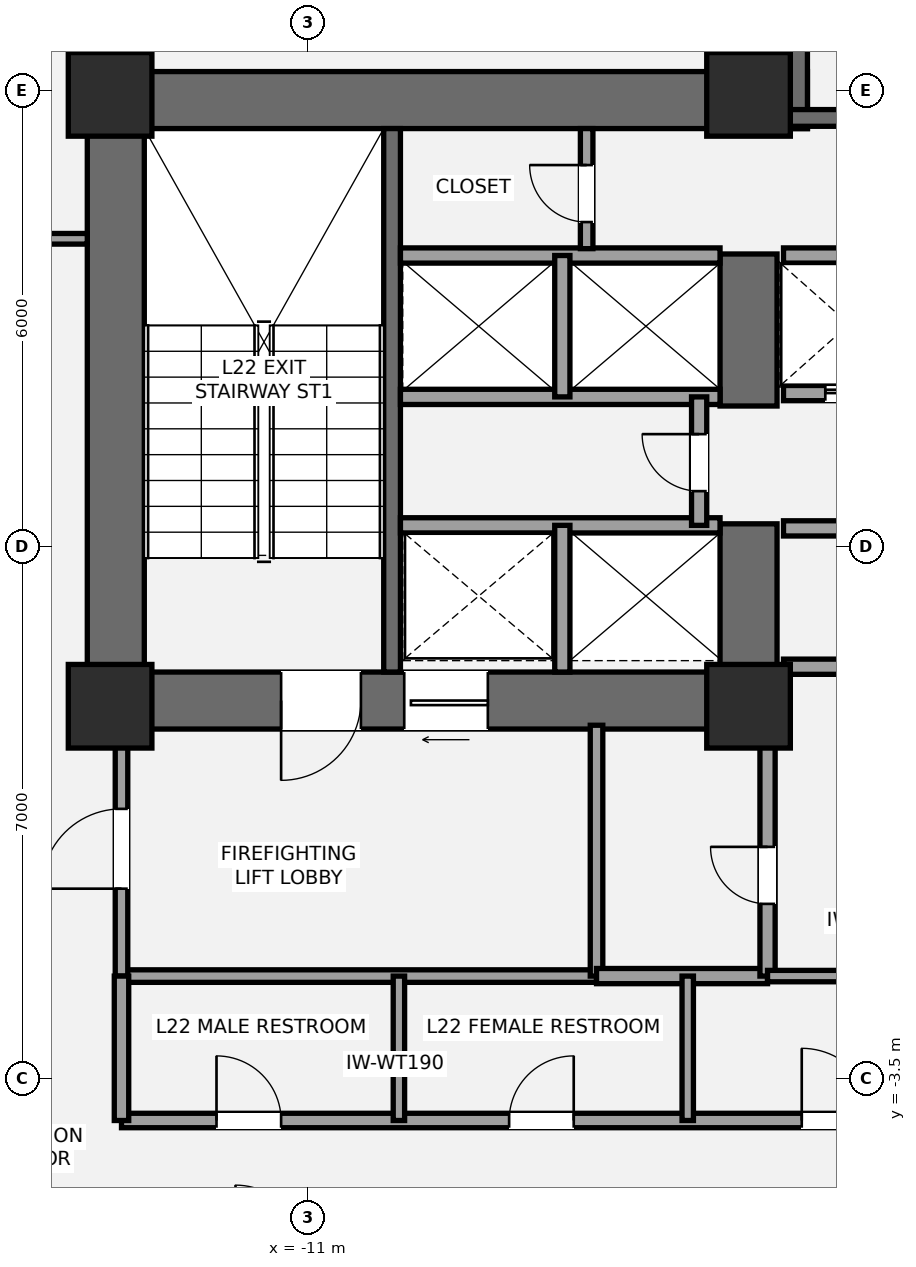
"""IFC4 building model, lengths in metres.
Left out: names, types, materials, properties, quantities, classifications, styles, units other than length and angle.
Written with IfcOpenShell. Run it as: python <this file> out.ifc"""

import sys

from ifc_helpers import new_model, si_unit, direction, frame, frame_2d, origin, origin_2d, place, context, subcontext, project, spatial, rectangle, extrude, element, fill, save


model = new_model("IFC4")
c1 = context("Model", 3, precision=1e-05, world=origin(), true_north=direction((0.0, 1.0)))
c2 = subcontext(c1, "Body", "Model", "MODEL_VIEW")
j1 = project(units=[si_unit("LENGTHUNIT", "METRE"), si_unit("PLANEANGLEUNIT", "RADIAN")], contexts=[c1])
p1 = place(None, origin())
s1 = spatial("IfcSite", under=j1, at=p1, CompositionType="ELEMENT")
p2 = place(p1, origin())
s2 = spatial("IfcBuilding", under=s1, at=p2, CompositionType="ELEMENT")
p3 = place(p2, frame((0.0, 0.0, 86.1)))
s3 = spatial("IfcBuildingStorey", under=s2, at=p3, CompositionType="ELEMENT", Elevation=86.1)
p4 = place(p3, frame((-13.525, 1.1, 0.0), z_axis=(0.0, 0.0, 1.0), x_axis=(0.0, 1.0, 0.0)))
e1 = element("IfcWall", 1, at=p4, inside=s3, PredefinedType="SHEAR", context=c2, shape_type="SweptSolid", body=[
    extrude(rectangle(XDim=8.65, YDim=0.75, at=frame_2d((4.325, 0.0))), origin(), (0.0, 0.0, 1.0), 3.5),
])
p5 = place(p3, frame((-13.9, 9.375, 0.0), z_axis=(0.0, 0.0, 1.0), x_axis=(1.0, 0.0, 0.0)))
e2 = element("IfcWall", 2, at=p5, inside=s3, PredefinedType="SHEAR", context=c2, shape_type="SweptSolid", body=[
    extrude(rectangle(XDim=9.475, YDim=0.75, at=frame_2d((4.737, 0.0))), origin(), (0.0, 0.0, 1.0), 3.5),
])
p6 = place(p3, frame((-4.825, 1.475, 0.0), z_axis=(0.0, 0.0, 1.0), x_axis=(-1.0, 0.0, 0.0)))
e3 = element("IfcWall", 3, at=p6, inside=s3, PredefinedType="SHEAR", context=c2, shape_type="SweptSolid", body=[
    extrude(rectangle(XDim=9.075, YDim=0.75, at=frame_2d((4.538, 0.0))), origin(), (0.0, 0.0, 1.0), 3.5),
])
p7 = place(p6, frame((5.475, 0.0, 0.0)))
e4 = element("IfcOpeningElement", 4, at=p7, cuts=e3, PredefinedType="OPENING", context=c2, shape_type="SweptSolid", body=[
    extrude(rectangle(XDim=1.05, YDim=2.15, at=frame_2d((0.525, 1.075))), frame((0.0, 0.385, 0.0), z_axis=(0.0, -1.0, 0.0), x_axis=(1.0, 0.0, 0.0)), (0.0, 0.0, 1.0), 0.77),
])
p8 = place(p6, frame((3.805, 0.0, 0.0)))
e5 = element("IfcOpeningElement", 5, at=p8, cuts=e3, PredefinedType="OPENING", context=c2, shape_type="SweptSolid", body=[
    extrude(rectangle(XDim=1.1, YDim=2.2, at=frame_2d((0.55, 1.1))), frame((0.0, 0.385, 0.0), z_axis=(0.0, -1.0, 0.0), x_axis=(1.0, 0.0, 0.0)), (0.0, 0.0, 1.0), 0.77),
])
p9 = place(p3, frame((-5.2, 1.1, 0.0), z_axis=(0.0, 0.0, 1.0), x_axis=(0.0, 1.0, 0.0)))
e6 = element("IfcWall", 6, at=p9, inside=s3, PredefinedType="SHEAR", context=c2, shape_type="SweptSolid", body=[
    extrude(rectangle(XDim=2.7, YDim=0.75, at=frame_2d((1.35, 0.0))), origin(), (0.0, 0.0, 1.0), 3.5),
])
p10 = place(p3, frame((-5.2, 5.35, 0.0), z_axis=(0.0, 0.0, 1.0), x_axis=(0.0, 1.0, 0.0)))
e7 = element("IfcWall", 7, at=p10, inside=s3, PredefinedType="SHEAR", context=c2, shape_type="SweptSolid", body=[
    extrude(rectangle(XDim=2.0, YDim=0.75, at=frame_2d((1.0, 0.0))), origin(), (0.0, 0.0, 1.0), 3.5),
])
p11 = place(p3, frame((-9.89, 1.85, 0.0), z_axis=(0.0, 0.0, 1.0), x_axis=(0.0, 1.0, 0.0)))
e8 = element("IfcWall", 8, at=p11, inside=s3, PredefinedType="SHEAR", context=c2, shape_type="SweptSolid", body=[
    extrude(rectangle(XDim=7.15, YDim=0.22, at=frame_2d((3.575, 0.0))), origin(), (0.0, 0.0, 1.0), 3.5),
])
p12 = place(p3, frame((-4.8, 9.0, 0.0), z_axis=(0.0, 0.0, 1.0), x_axis=(0.0, 1.0, 0.0)))
e9 = element("IfcWall", 9, at=p12, inside=s3, PredefinedType="SHEAR", context=c2, shape_type="SweptSolid", body=[
    extrude(rectangle(XDim=4.15, YDim=0.75, at=frame_2d((2.075, 0.0))), origin(), (0.0, 0.0, 1.0), 3.5),
])
p13 = place(p3, frame((-4.7, 9.14, 0.0), z_axis=(0.0, 0.0, 1.0), x_axis=(1.0, 0.0, 0.0)))
e10 = element("IfcWall", 10, at=p13, inside=s3, PredefinedType="SHEAR", context=c2, shape_type="SweptSolid", body=[
    extrude(rectangle(XDim=9.3, YDim=0.22, at=frame_2d((4.65, 0.0))), origin(), (0.0, 0.0, 1.0), 3.5),
])
p14 = place(p13, frame((1.15, 0.0, 0.0)))
e11 = element("IfcOpeningElement", 11, at=p14, cuts=e10, PredefinedType="OPENING", context=c2, shape_type="SweptSolid", body=[
    extrude(rectangle(XDim=1.05, YDim=2.15, at=frame_2d((0.525, 1.075))), frame((0.0, 0.12, 0.0), z_axis=(0.0, -1.0, 0.0), x_axis=(1.0, 0.0, 0.0)), (0.0, 0.0, 1.0), 0.24),
])
for number, where, z_axis, x_axis in (
    (12, (-13.6, 1.4, 0.0), (0.0, 0.0, 1.0), (1.0, 0.0, 0.0)),
    (13, (-13.6, 9.45, 0.0), (0.0, 0.0, 1.0), (1.0, 0.0, 0.0)),
    (14, (-5.2, 1.4, 0.0), (0.0, 0.0, 1.0), (1.0, 0.0, 0.0)),
    (15, (-5.2, 9.45, 0.0), (0.0, 0.0, 1.0), (1.0, 0.0, 0.0)),
):
    element("IfcColumn", number, at=place(p3, frame(where, z_axis=z_axis, x_axis=x_axis)), inside=s3, PredefinedType="COLUMN", context=c2, shape_type="SweptSolid", body=[
        extrude(rectangle(XDim=1.1, YDim=1.1, at=origin_2d()), origin(), (0.0, 0.0, 1.0), 3.5),
    ])
p15 = place(p3, frame((-13.45, -2.15, 0.0), z_axis=(0.0, 0.0, 1.0), x_axis=(1.0, 0.0, 0.0)))
e16 = element("IfcWall", 16, at=p15, inside=s3, PredefinedType="PARTITIONING", context=c2, shape_type="SweptSolid", body=[
    extrude(rectangle(XDim=6.25, YDim=0.165, at=frame_2d((3.125, 0.0))), origin(), (0.0, 0.0, 1.0), 3.31),
])
p16 = place(p3, frame((-13.45, -2.15, 0.0), z_axis=(0.0, 0.0, 1.0), x_axis=(0.0, 1.0, 0.0)))
e17 = element("IfcWall", 17, at=p16, inside=s3, PredefinedType="PARTITIONING", context=c2, shape_type="SweptSolid", body=[
    extrude(rectangle(XDim=3.3, YDim=0.165, at=frame_2d((1.65, 0.0))), origin(), (0.0, 0.0, 1.0), 2.763),
])
p17 = place(p16, frame((1.15, 0.0, 0.0)))
e18 = element("IfcOpeningElement", 18, at=p17, cuts=e17, PredefinedType="OPENING", context=c2, shape_type="SweptSolid", body=[
    extrude(rectangle(XDim=1.05, YDim=2.15, at=frame_2d((0.525, 1.075))), frame((0.0, 0.093, 0.0), z_axis=(0.0, -1.0, 0.0), x_axis=(1.0, 0.0, 0.0)), (0.0, 0.0, 1.0), 0.185),
])
p18 = place(p3, frame((-7.2, -2.15, 0.0), z_axis=(0.0, 0.0, 1.0), x_axis=(0.0, 1.0, 0.0)))
e19 = element("IfcWall", 19, at=p18, inside=s3, PredefinedType="PARTITIONING", context=c2, shape_type="SweptSolid", body=[
    extrude(rectangle(XDim=3.3, YDim=0.165, at=frame_2d((1.65, 0.0))), origin(), (0.0, 0.0, 1.0), 3.31),
])
p19 = place(p3, frame((-7.2, -2.15, 0.0), z_axis=(0.0, 0.0, 1.0), x_axis=(1.0, 0.0, 0.0)))
e20 = element("IfcWall", 20, at=p19, inside=s3, PredefinedType="SOLIDWALL", context=c2, shape_type="SweptSolid", body=[
    extrude(rectangle(XDim=2.25, YDim=0.2, at=frame_2d((1.125, 0.0))), origin(), (0.0, 0.0, 1.0), 3.31),
])
p20 = place(p3, frame((-4.95, -2.15, 0.0), z_axis=(0.0, 0.0, 1.0), x_axis=(0.0, 1.0, 0.0)))
e21 = element("IfcWall", 21, at=p20, inside=s3, PredefinedType="SOLIDWALL", context=c2, shape_type="SweptSolid", body=[
    extrude(rectangle(XDim=3.3, YDim=0.2, at=frame_2d((1.65, 0.0))), origin(), (0.0, 0.0, 1.0), 2.763),
])
p21 = place(p20, frame((0.95, 0.0, 0.0)))
e22 = element("IfcOpeningElement", 22, at=p21, cuts=e21, PredefinedType="OPENING", context=c2, shape_type="SweptSolid", body=[
    extrude(rectangle(XDim=0.75, YDim=2.1, at=frame_2d((0.375, 1.05))), frame((0.0, 0.11, 0.0), z_axis=(0.0, -1.0, 0.0), x_axis=(1.0, 0.0, 0.0)), (0.0, 0.0, 1.0), 0.22),
])
p22 = place(p3, frame((-9.78, 3.78, 0.0), z_axis=(0.0, 0.0, 1.0), x_axis=(1.0, 0.0, 0.0)))
e23 = element("IfcWall", 23, at=p22, inside=s3, PredefinedType="SOLIDWALL", context=c2, shape_type="SweptSolid", body=[
    extrude(rectangle(XDim=4.205, YDim=0.2, at=frame_2d((2.103, 0.0))), origin(), (0.0, 0.0, 1.0), 3.31),
])
p23 = place(p3, frame((-7.65, 1.85, 0.0), z_axis=(0.0, 0.0, 1.0), x_axis=(0.0, 1.0, 0.0)))
e24 = element("IfcWall", 24, at=p23, inside=s3, PredefinedType="SOLIDWALL", context=c2, shape_type="SweptSolid", body=[
    extrude(rectangle(XDim=1.93, YDim=0.2, at=frame_2d((0.965, 0.0))), origin(), (0.0, 0.0, 1.0), 3.31),
])
for number, where, z_axis, x_axis in (
    (25, (-9.78, 5.47, 0.0), (0.0, 0.0, 1.0), (1.0, 0.0, 0.0)),
    (26, (-9.78, 7.33, 0.0), (0.0, 0.0, 1.0), (1.0, 0.0, 0.0)),
):
    element("IfcWall", number, at=place(p3, frame(where, z_axis=z_axis, x_axis=x_axis)), inside=s3, PredefinedType="SOLIDWALL", context=c2, shape_type="SweptSolid", body=[
        extrude(rectangle(XDim=4.205, YDim=0.2, at=frame_2d((2.103, 0.0))), origin(), (0.0, 0.0, 1.0), 3.31),
    ])
p24 = place(p3, frame((-7.65, 5.47, 0.0), z_axis=(0.0, 0.0, 1.0), x_axis=(0.0, 1.0, 0.0)))
e27 = element("IfcWall", 27, at=p24, inside=s3, PredefinedType="SOLIDWALL", context=c2, shape_type="SweptSolid", body=[
    extrude(rectangle(XDim=1.86, YDim=0.2, at=frame_2d((0.93, 0.0))), origin(), (0.0, 0.0, 1.0), 3.31),
])
p25 = place(p3, frame((-5.85, 3.78, 0.0), z_axis=(0.0, 0.0, 1.0), x_axis=(0.0, 1.0, 0.0)))
e28 = element("IfcWall", 28, at=p25, inside=s3, PredefinedType="SOLIDWALL", context=c2, shape_type="SweptSolid", body=[
    extrude(rectangle(XDim=1.69, YDim=0.2, at=frame_2d((0.845, 0.0))), origin(), (0.0, 0.0, 1.0), 3.31),
])
p26 = place(p25, frame((0.45, 0.0, 0.0)))
e29 = element("IfcOpeningElement", 29, at=p26, cuts=e28, PredefinedType="OPENING", context=c2, shape_type="SweptSolid", body=[
    extrude(rectangle(XDim=0.75, YDim=2.1, at=frame_2d((0.375, 1.05))), frame((0.0, 0.11, 0.0), z_axis=(0.0, -1.0, 0.0), x_axis=(1.0, 0.0, 0.0)), (0.0, 0.0, 1.0), 0.22),
])
p27 = place(p3, frame((-4.74, 1.92, 0.0), z_axis=(0.0, 0.0, 1.0), x_axis=(1.0, 0.0, 0.0)))
e30 = element("IfcWall", 30, at=p27, inside=s3, PredefinedType="SOLIDWALL", context=c2, shape_type="SweptSolid", body=[
    extrude(rectangle(XDim=9.48, YDim=0.2, at=frame_2d((4.74, 0.0))), origin(), (0.0, 0.0, 1.0), 2.3),
])
p28 = place(p3, frame((-4.74, 3.74, 0.0), z_axis=(0.0, 0.0, 1.0), x_axis=(1.0, 0.0, 0.0)))
e31 = element("IfcWall", 31, at=p28, inside=s3, PredefinedType="SOLIDWALL", context=c2, shape_type="SweptSolid", body=[
    extrude(rectangle(XDim=9.48, YDim=0.2, at=frame_2d((4.74, 0.0))), origin(), (0.0, 0.0, 1.0), 3.31),
])
p29 = place(p28, frame((1.8, 0.0, 0.0)))
e32 = element("IfcOpeningElement", 32, at=p29, cuts=e31, PredefinedType="OPENING", context=c2, shape_type="SweptSolid", body=[
    extrude(rectangle(XDim=0.85, YDim=2.1, at=frame_2d((0.425, 1.05))), frame((0.0, 0.11, 0.0), z_axis=(0.0, -1.0, 0.0), x_axis=(1.0, 0.0, 0.0)), (0.0, 0.0, 1.0), 0.22),
])
p30 = place(p28, frame((6.8, 0.0, 0.0)))
e33 = element("IfcOpeningElement", 33, at=p30, cuts=e31, PredefinedType="OPENING", context=c2, shape_type="SweptSolid", body=[
    extrude(rectangle(XDim=0.85, YDim=2.1, at=frame_2d((0.425, 1.05))), frame((0.0, 0.11, 0.0), z_axis=(0.0, -1.0, 0.0), x_axis=(1.0, 0.0, 0.0)), (0.0, 0.0, 1.0), 0.22),
])
p31 = place(p3, frame((-4.74, 5.52, 0.0), z_axis=(0.0, 0.0, 1.0), x_axis=(1.0, 0.0, 0.0)))
e34 = element("IfcWall", 34, at=p31, inside=s3, PredefinedType="SOLIDWALL", context=c2, shape_type="SweptSolid", body=[
    extrude(rectangle(XDim=3.86, YDim=0.2, at=frame_2d((1.93, 0.0))), origin(), (0.0, 0.0, 1.0), 3.31),
])
p32 = place(p31, frame((0.55, 0.0, 0.0)))
e35 = element("IfcOpeningElement", 35, at=p32, cuts=e34, PredefinedType="OPENING", context=c2, shape_type="SweptSolid", body=[
    extrude(rectangle(XDim=1.1, YDim=2.2, at=frame_2d((0.55, 1.1))), frame((0.0, 0.11, 0.0), z_axis=(0.0, -1.0, 0.0), x_axis=(1.0, 0.0, 0.0)), (0.0, 0.0, 1.0), 0.22),
])
p33 = place(p31, frame((2.3, 0.0, 0.0)))
e36 = element("IfcOpeningElement", 36, at=p33, cuts=e34, PredefinedType="OPENING", context=c2, shape_type="SweptSolid", body=[
    extrude(rectangle(XDim=1.1, YDim=2.2, at=frame_2d((0.55, 1.1))), frame((0.0, 0.11, 0.0), z_axis=(0.0, -1.0, 0.0), x_axis=(1.0, 0.0, 0.0)), (0.0, 0.0, 1.0), 0.22),
])
p34 = place(p3, frame((-4.74, 7.33, 0.0), z_axis=(0.0, 0.0, 1.0), x_axis=(1.0, 0.0, 0.0)))
e37 = element("IfcWall", 37, at=p34, inside=s3, PredefinedType="SOLIDWALL", context=c2, shape_type="SweptSolid", body=[
    extrude(rectangle(XDim=3.86, YDim=0.2, at=frame_2d((1.93, 0.0))), origin(), (0.0, 0.0, 1.0), 3.31),
])
p35 = place(p3, frame((-7.33, 7.42, 0.0), z_axis=(0.0, 0.0, 1.0), x_axis=(0.0, 1.0, 0.0)))
e38 = element("IfcWall", 38, at=p35, inside=s3, PredefinedType="PARTITIONING", context=c2, shape_type="SweptSolid", body=[
    extrude(rectangle(XDim=1.58, YDim=0.165, at=frame_2d((0.79, 0.0))), origin(), (0.0, 0.0, 1.0), 3.31),
])
p36 = place(p35, frame((0.35, 0.0, 0.0)))
e39 = element("IfcOpeningElement", 39, at=p36, cuts=e38, PredefinedType="OPENING", context=c2, shape_type="SweptSolid", body=[
    extrude(rectangle(XDim=0.75, YDim=2.1, at=frame_2d((0.375, 1.05))), frame((0.0, 0.093, 0.0), z_axis=(0.0, -1.0, 0.0), x_axis=(1.0, 0.0, 0.0)), (0.0, 0.0, 1.0), 0.185),
])
p37 = place(p3, frame((-13.45, -4.05, 0.0), z_axis=(0.0, 0.0, 1.0), x_axis=(1.0, 0.0, 0.0)))
e40 = element("IfcWall", 40, at=p37, inside=s3, PredefinedType="PLUMBINGWALL", context=c2, shape_type="SweptSolid", body=[
    extrude(rectangle(XDim=11.35, YDim=0.19, at=frame_2d((5.675, 0.0))), origin(), (0.0, 0.0, 1.0), 2.763),
])
p38 = place(p37, frame((1.25, 0.0, 0.0)))
e41 = element("IfcOpeningElement", 41, at=p38, cuts=e40, PredefinedType="OPENING", context=c2, shape_type="SweptSolid", body=[
    extrude(rectangle(XDim=0.85, YDim=2.1, at=frame_2d((0.425, 1.05))), frame((0.0, 0.105, 0.0), z_axis=(0.0, -1.0, 0.0), x_axis=(1.0, 0.0, 0.0)), (0.0, 0.0, 1.0), 0.21),
])
p39 = place(p37, frame((5.1, 0.0, 0.0)))
e42 = element("IfcOpeningElement", 42, at=p39, cuts=e40, PredefinedType="OPENING", context=c2, shape_type="SweptSolid", body=[
    extrude(rectangle(XDim=0.85, YDim=2.1, at=frame_2d((0.425, 1.05))), frame((0.0, 0.105, 0.0), z_axis=(0.0, -1.0, 0.0), x_axis=(1.0, 0.0, 0.0)), (0.0, 0.0, 1.0), 0.21),
])
p40 = place(p37, frame((8.95, 0.0, 0.0)))
e43 = element("IfcOpeningElement", 43, at=p40, cuts=e40, PredefinedType="OPENING", context=c2, shape_type="SweptSolid", body=[
    extrude(rectangle(XDim=0.95, YDim=2.15, at=frame_2d((0.475, 1.075))), frame((0.0, 0.105, 0.0), z_axis=(0.0, -1.0, 0.0), x_axis=(1.0, 0.0, 0.0)), (0.0, 0.0, 1.0), 0.21),
])
p41 = place(p3, frame((-4.95, -2.15, 0.0), z_axis=(0.0, 0.0, 1.0), x_axis=(1.0, 0.0, 0.0)))
e44 = element("IfcWall", 44, at=p41, inside=s3, PredefinedType="PLUMBINGWALL", context=c2, shape_type="SweptSolid", body=[
    extrude(rectangle(XDim=2.85, YDim=0.15, at=frame_2d((1.425, 0.0))), origin(), (0.0, 0.0, 1.0), 3.31),
])
p42 = place(p3, frame((-13.45, -4.05, 0.0), z_axis=(0.0, 0.0, 1.0), x_axis=(0.0, 1.0, 0.0)))
e45 = element("IfcWall", 45, at=p42, inside=s3, PredefinedType="PLUMBINGWALL", context=c2, shape_type="SweptSolid", body=[
    extrude(rectangle(XDim=1.9, YDim=0.19, at=frame_2d((0.95, 0.0))), origin(), (0.0, 0.0, 1.0), 3.31),
])
p43 = place(p3, frame((-9.8, -4.05, 0.0), z_axis=(0.0, 0.0, 1.0), x_axis=(0.0, 1.0, 0.0)))
e46 = element("IfcWall", 46, at=p43, inside=s3, PredefinedType="PLUMBINGWALL", context=c2, shape_type="SweptSolid", body=[
    extrude(rectangle(XDim=1.9, YDim=0.15, at=frame_2d((0.95, 0.0))), origin(), (0.0, 0.0, 1.0), 3.31),
])
p44 = place(p3, frame((-6.0, -4.05, 0.0), z_axis=(0.0, 0.0, 1.0), x_axis=(0.0, 1.0, 0.0)))
e47 = element("IfcWall", 47, at=p44, inside=s3, PredefinedType="PLUMBINGWALL", context=c2, shape_type="SweptSolid", body=[
    extrude(rectangle(XDim=1.9, YDim=0.15, at=frame_2d((0.95, 0.0))), origin(), (0.0, 0.0, 1.0), 2.751),
])
p45 = place(p3, frame((-16.2, 7.55, 0.0), z_axis=(0.0, 0.0, 1.0), x_axis=(1.0, 0.0, 0.0)))
e48 = element("IfcWall", 48, at=p45, inside=s3, PredefinedType="PARTITIONING", context=c2, shape_type="SweptSolid", body=[
    extrude(rectangle(XDim=2.3, YDim=0.14, at=frame_2d((1.15, 0.0))), origin(), (0.0, 0.0, 1.0), 2.763),
])
p46 = place(p45, frame((0.32, 0.0, 0.0)))
e49 = element("IfcOpeningElement", 49, at=p46, cuts=e48, PredefinedType="OPENING", context=c2, shape_type="SweptSolid", body=[
    extrude(rectangle(XDim=0.92, YDim=2.15, at=frame_2d((0.46, 1.075))), frame((0.0, 0.08, 0.0), z_axis=(0.0, -1.0, 0.0), x_axis=(1.0, 0.0, 0.0)), (0.0, 0.0, 1.0), 0.16),
])
p47 = place(p7, origin())
e50 = element("IfcDoor", 50, at=p47, inside=s3, OperationType="SINGLE_SWING_RIGHT", PredefinedType="DOOR", context=c2, shape_type="SweptSolid", body=[
    extrude(rectangle(XDim=1.05, YDim=2.15, at=frame_2d((0.525, 1.075))), frame((0.0, 0.025, 0.0), z_axis=(0.0, -1.0, 0.0), x_axis=(1.0, 0.0, 0.0)), (0.0, 0.0, 1.0), 0.05),
])
fill(e4, e50)
p48 = place(p17, origin())
e51 = element("IfcDoor", 51, at=p48, inside=s3, OperationType="SINGLE_SWING_LEFT", PredefinedType="DOOR", context=c2, shape_type="SweptSolid", body=[
    extrude(rectangle(XDim=1.05, YDim=2.15, at=frame_2d((0.525, 1.075))), frame((0.0, 0.025, 0.0), z_axis=(0.0, -1.0, 0.0), x_axis=(1.0, 0.0, 0.0)), (0.0, 0.0, 1.0), 0.05),
])
fill(e18, e51)
p49 = place(p21, origin())
e52 = element("IfcDoor", 52, at=p49, inside=s3, OperationType="SINGLE_SWING_RIGHT", PredefinedType="DOOR", context=c2, shape_type="SweptSolid", body=[
    extrude(rectangle(XDim=0.75, YDim=2.1, at=frame_2d((0.375, 1.05))), frame((0.0, 0.025, 0.0), z_axis=(0.0, -1.0, 0.0), x_axis=(1.0, 0.0, 0.0)), (0.0, 0.0, 1.0), 0.05),
])
fill(e22, e52)
p50 = place(p8, origin())
e53 = element("IfcDoor", 53, at=p50, inside=s3, OperationType="SLIDING_TO_LEFT", PredefinedType="DOOR", context=c2, shape_type="SweptSolid", body=[
    extrude(rectangle(XDim=1.1, YDim=2.2, at=frame_2d((0.55, 1.1))), frame((0.0, 0.025, 0.0), z_axis=(0.0, -1.0, 0.0), x_axis=(1.0, 0.0, 0.0)), (0.0, 0.0, 1.0), 0.05),
])
fill(e5, e53)
p51 = place(p26, origin())
e54 = element("IfcDoor", 54, at=p51, inside=s3, OperationType="SINGLE_SWING_RIGHT", PredefinedType="DOOR", context=c2, shape_type="SweptSolid", body=[
    extrude(rectangle(XDim=0.75, YDim=2.1, at=frame_2d((0.375, 1.05))), frame((0.0, 0.025, 0.0), z_axis=(0.0, -1.0, 0.0), x_axis=(1.0, 0.0, 0.0)), (0.0, 0.0, 1.0), 0.05),
])
fill(e29, e54)
p52 = place(p32, origin())
e55 = element("IfcDoor", 55, at=p52, inside=s3, OperationType="SLIDING_TO_LEFT", PredefinedType="DOOR", context=c2, shape_type="SweptSolid", body=[
    extrude(rectangle(XDim=1.1, YDim=2.2, at=frame_2d((0.55, 1.1))), frame((0.0, 0.025, 0.0), z_axis=(0.0, -1.0, 0.0), x_axis=(1.0, 0.0, 0.0)), (0.0, 0.0, 1.0), 0.05),
])
fill(e35, e55)
p53 = place(p36, origin())
e56 = element("IfcDoor", 56, at=p53, inside=s3, OperationType="SINGLE_SWING_RIGHT", PredefinedType="DOOR", context=c2, shape_type="SweptSolid", body=[
    extrude(rectangle(XDim=0.75, YDim=2.1, at=frame_2d((0.375, 1.05))), frame((0.0, 0.025, 0.0), z_axis=(0.0, -1.0, 0.0), x_axis=(1.0, 0.0, 0.0)), (0.0, 0.0, 1.0), 0.05),
])
fill(e39, e56)
p54 = place(p38, origin())
e57 = element("IfcDoor", 57, at=p54, inside=s3, OperationType="SINGLE_SWING_LEFT", PredefinedType="DOOR", context=c2, shape_type="SweptSolid", body=[
    extrude(rectangle(XDim=0.85, YDim=2.1, at=frame_2d((0.425, 1.05))), frame((0.0, 0.025, 0.0), z_axis=(0.0, -1.0, 0.0), x_axis=(1.0, 0.0, 0.0)), (0.0, 0.0, 1.0), 0.05),
])
fill(e41, e57)
p55 = place(p39, origin())
e58 = element("IfcDoor", 58, at=p55, inside=s3, OperationType="SINGLE_SWING_RIGHT", PredefinedType="DOOR", context=c2, shape_type="SweptSolid", body=[
    extrude(rectangle(XDim=0.85, YDim=2.1, at=frame_2d((0.425, 1.05))), frame((0.0, 0.025, 0.0), z_axis=(0.0, -1.0, 0.0), x_axis=(1.0, 0.0, 0.0)), (0.0, 0.0, 1.0), 0.05),
])
fill(e42, e58)
p56 = place(p40, origin())
e59 = element("IfcDoor", 59, at=p56, inside=s3, OperationType="SINGLE_SWING_LEFT", PredefinedType="DOOR", context=c2, shape_type="SweptSolid", body=[
    extrude(rectangle(XDim=0.95, YDim=2.15, at=frame_2d((0.475, 1.075))), frame((0.0, 0.025, 0.0), z_axis=(0.0, -1.0, 0.0), x_axis=(1.0, 0.0, 0.0)), (0.0, 0.0, 1.0), 0.05),
])
fill(e43, e59)
save(model, sys.argv[1])
